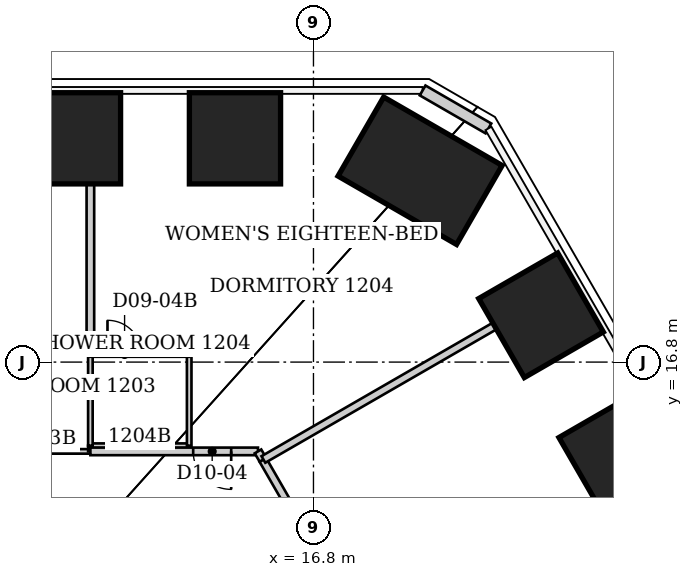
"""IFC4 building model, lengths in metres.
Left out: names, types, materials, properties, quantities, classifications, styles, units other than length and angle.
Written with IfcOpenShell. Run it as: python <this file> out.ifc"""

import sys

from ifc_helpers import new_model, si_unit, direction, frame, frame_2d, origin, origin_2d, place, context, subcontext, project, spatial, rectangle, extrude, clip, halfspace, element, fill, save


model = new_model("IFC4")
c1 = context("Model", 3, precision=1e-05, world=origin(), true_north=direction((0.0, 1.0)))
c2 = subcontext(c1, "Body", "Model", "MODEL_VIEW")
j1 = project(units=[si_unit("LENGTHUNIT", "METRE"), si_unit("PLANEANGLEUNIT", "RADIAN")], contexts=[c1])
p1 = place(None, origin())
s1 = spatial("IfcSite", under=j1, at=p1, CompositionType="ELEMENT")
p2 = place(p1, origin())
s2 = spatial("IfcBuilding", under=s1, at=p2, CompositionType="ELEMENT")
p3 = place(p2, frame((0.0, 0.0, 53.4)))
s3 = spatial("IfcBuildingStorey", under=s2, at=p3, CompositionType="ELEMENT", Elevation=53.4)
p4 = place(p3, frame((10.525, 22.689, 0.0), z_axis=(0.0, 0.0, 1.0), x_axis=(0.0, 1.0, 0.0)))
e1 = element("IfcColumn", 1, at=p4, inside=s3, PredefinedType="COLUMN", context=c2, shape_type="SweptSolid", body=[
    clip(extrude(rectangle(XDim=2.4, YDim=2.4, at=origin_2d()), origin(), (0.0, 0.0, 1.0), 3.736), halfspace(frame((0.0, 0.0, 3.64)), False)),
])
p5 = place(p3, frame((14.735, 22.689, 0.0), z_axis=(0.0, 0.0, 1.0), x_axis=(0.0, 1.0, 0.0)))
e2 = element("IfcColumn", 2, at=p5, inside=s3, PredefinedType="COLUMN", context=c2, shape_type="SweptSolid", body=[
    clip(extrude(rectangle(XDim=2.4, YDim=2.4, at=origin_2d()), origin(), (0.0, 0.0, 1.0), 3.728), halfspace(frame((0.0, 0.0, 3.64)), False)),
])
p6 = place(p3, frame((19.606, 21.835, 0.0), z_axis=(0.0, 0.0, 1.0), x_axis=(0.5, 0.866025403784, 0.0)))
e3 = element("IfcColumn", 3, at=p6, inside=s3, PredefinedType="COLUMN", context=c2, shape_type="SweptSolid", body=[
    clip(extrude(rectangle(XDim=2.4, YDim=3.6, at=origin_2d()), origin(), (0.0, 0.0, 1.0), 3.726), halfspace(frame((0.0, 0.0, 3.64)), False)),
])
p7 = place(p3, frame((22.788, 18.032, 0.0), z_axis=(0.0, 0.0, 1.0), x_axis=(0.866025403784, 0.5, 0.0)))
e4 = element("IfcColumn", 4, at=p7, inside=s3, PredefinedType="COLUMN", context=c2, shape_type="SweptSolid", body=[
    clip(extrude(rectangle(XDim=2.4, YDim=2.4, at=origin_2d()), origin(), (0.0, 0.0, 1.0), 3.737), halfspace(frame((0.0, 0.0, 3.64)), False)),
])
p8 = place(p3, frame((24.899, 14.375, 0.0), z_axis=(0.0, 0.0, 1.0), x_axis=(0.866025403784, 0.5, 0.0)))
e5 = element("IfcColumn", 5, at=p8, inside=s3, PredefinedType="COLUMN", context=c2, shape_type="SweptSolid", body=[
    clip(extrude(rectangle(XDim=2.4, YDim=2.4, at=origin_2d()), origin(), (0.0, 0.0, 1.0), 3.745), halfspace(frame((0.0, 0.0, 3.64)), False)),
])
p9 = place(p3, frame((19.672, 23.949, 0.0), z_axis=(0.0, 0.0, 1.0), x_axis=(0.866010750942, -0.50002537861, 0.0)))
e6 = element("IfcWall", 6, at=p9, inside=s3, PredefinedType="SOLIDWALL", context=c2, shape_type="SweptSolid", body=[
    extrude(rectangle(XDim=2.0, YDim=0.3, at=frame_2d((1.0, 0.0))), origin(), (0.0, 0.0, 1.0), 3.64),
])
p10 = place(p3, frame((10.93, 14.45, 0.0), z_axis=(0.0, 0.0, 1.0), x_axis=(-1.0, 0.0, 0.0)))
e7 = element("IfcWall", 7, at=p10, inside=s3, PredefinedType="PARTITIONING", context=c2, shape_type="SweptSolid", body=[
    extrude(rectangle(XDim=2.4, YDim=0.12, at=frame_2d((1.2, 0.0))), origin(), (0.0, 0.0, 1.0), 3.64),
])
p11 = place(p3, frame((10.93, 14.6, 0.0), z_axis=(0.0, 0.0, 1.0), x_axis=(0.0, -1.0, 0.0)))
e8 = element("IfcWall", 8, at=p11, inside=s3, PredefinedType="PARTITIONING", context=c2, shape_type="SweptSolid", body=[
    extrude(rectangle(XDim=0.15, YDim=0.12, at=frame_2d((0.075, 0.0))), origin(), (0.0, 0.0, 1.0), 3.64),
])
p12 = place(p3, frame((10.93, 14.6, 0.0), z_axis=(0.0, 0.0, 1.0), x_axis=(1.0, 0.0, 0.0)))
e9 = element("IfcWall", 9, at=p12, inside=s3, PredefinedType="PARTITIONING", context=c2, shape_type="SweptSolid", body=[
    extrude(rectangle(XDim=2.6, YDim=0.12, at=frame_2d((1.3, 0.0))), origin(), (0.0, 0.0, 1.0), 3.64),
])
for number, where, z_axis, x_axis in (
    (10, (10.93, 17.0, 0.0), (0.0, 0.0, 1.0), (0.0, -1.0, 0.0)),
    (11, (10.93, 17.07, 0.0), (0.0, 0.0, 1.0), (-1.0, 0.0, 0.0)),
):
    element("IfcWall", number, at=place(p3, frame(where, z_axis=z_axis, x_axis=x_axis)), inside=s3, PredefinedType="PARTITIONING", context=c2, shape_type="SweptSolid", body=[
        extrude(rectangle(XDim=2.4, YDim=0.12, at=frame_2d((1.2, 0.0))), origin(), (0.0, 0.0, 1.0), 3.64),
    ])
p13 = place(p3, frame((10.93, 23.83, 0.0), z_axis=(0.0, 0.0, 1.0), x_axis=(0.0, -1.0, 0.0)))
e12 = element("IfcWall", 12, at=p13, inside=s3, PredefinedType="PARTITIONING", context=c2, shape_type="SweptSolid", body=[
    extrude(rectangle(XDim=6.76, YDim=0.2, at=frame_2d((3.38, 0.0))), origin(), (0.0, 0.0, 1.0), 3.64),
])
p14 = place(p3, frame((13.53, 14.6, 0.0), z_axis=(0.0, 0.0, 1.0), x_axis=(0.0, 1.0, 0.0)))
e13 = element("IfcWall", 13, at=p14, inside=s3, PredefinedType="PARTITIONING", context=c2, shape_type="SweptSolid", body=[
    extrude(rectangle(XDim=2.4, YDim=0.12, at=frame_2d((1.2, 0.0))), origin(), (0.0, 0.0, 1.0), 3.64),
])
p15 = place(p3, frame((13.53, 17.0, 0.0), z_axis=(0.0, 0.0, 1.0), x_axis=(-1.0, 0.0, 0.0)))
e14 = element("IfcWall", 14, at=p15, inside=s3, PredefinedType="PARTITIONING", context=c2, shape_type="SweptSolid", body=[
    extrude(rectangle(XDim=2.6, YDim=0.12, at=frame_2d((1.3, 0.0))), origin(), (0.0, 0.0, 1.0), 3.64),
])
p16 = place(p15, frame((1.25, 0.0, 0.0)))
e15 = element("IfcOpeningElement", 15, at=p16, cuts=e14, PredefinedType="OPENING", context=c2, shape_type="SweptSolid", body=[
    extrude(rectangle(XDim=0.9, YDim=2.03, at=frame_2d((0.45, 1.015))), frame((0.0, 0.06, 0.0), z_axis=(0.0, -1.0, 0.0), x_axis=(1.0, 0.0, 0.0)), (0.0, 0.0, 1.0), 0.12),
])
p17 = place(p3, frame((15.34, 14.45, 0.0), z_axis=(0.0, 0.0, 1.0), x_axis=(-1.0, 0.0, 0.0)))
e16 = element("IfcWall", 16, at=p17, inside=s3, PredefinedType="PARTITIONING", context=c2, shape_type="SweptSolid", body=[
    extrude(rectangle(XDim=4.41, YDim=0.2, at=frame_2d((2.205, 0.0))), origin(), (0.0, 0.0, 1.0), 3.64),
])
p18 = place(p17, frame((0.705, 0.0, 0.0)))
e17 = element("IfcOpeningElement", 17, at=p18, cuts=e16, PredefinedType="OPENING", context=c2, shape_type="SweptSolid", body=[
    extrude(rectangle(XDim=1.0, YDim=2.13, at=frame_2d((0.5, 1.065))), frame((0.0, 0.1, 0.0), z_axis=(0.0, -1.0, 0.0), x_axis=(1.0, 0.0, 0.0)), (0.0, 0.0, 1.0), 0.2),
])
p19 = place(p3, frame((15.467, 14.229, 0.0), z_axis=(0.0, 0.0, 1.0), x_axis=(0.499491884095, -0.866318565958, 0.0)))
e18 = element("IfcWall", 18, at=p19, inside=s3, PredefinedType="PARTITIONING", context=c2, shape_type="SweptSolid", body=[
    extrude(rectangle(XDim=4.95, YDim=0.2, at=frame_2d((2.475, 0.0))), origin(), (0.0, 0.0, 1.0), 3.64),
])
p20 = place(p19, frame((1.975, 0.0, 0.0)))
e19 = element("IfcOpeningElement", 19, at=p20, cuts=e18, PredefinedType="OPENING", context=c2, shape_type="SweptSolid", body=[
    extrude(rectangle(XDim=1.0, YDim=2.13, at=frame_2d((0.5, 1.065))), frame((0.0, 0.1, 0.0), z_axis=(0.0, -1.0, 0.0), x_axis=(1.0, 0.0, 0.0)), (0.0, 0.0, 1.0), 0.2),
])
p21 = place(p3, frame((15.47, 14.23, 0.0), z_axis=(0.0, 0.0, 1.0), x_axis=(-0.508439495802, 0.861097717514, 0.0)))
e20 = element("IfcWall", 20, at=p21, inside=s3, PredefinedType="PARTITIONING", context=c2, shape_type="SweptSolid", body=[
    extrude(rectangle(XDim=0.255, YDim=0.2, at=frame_2d((0.128, 0.0))), origin(), (0.0, 0.0, 1.0), 3.64),
])
p22 = place(p3, frame((23.596, 18.92, 0.0), z_axis=(0.0, 0.0, 1.0), x_axis=(-0.866103566674, -0.499864593459, 0.0)))
e21 = element("IfcWall", 21, at=p22, inside=s3, PredefinedType="PARTITIONING", context=c2, shape_type="SweptSolid", body=[
    extrude(rectangle(XDim=9.367, YDim=0.2, at=frame_2d((4.684, 0.0))), origin(), (0.0, 0.0, 1.0), 3.64),
])
p23 = place(p18, origin())
e22 = element("IfcDoor", 22, at=p23, inside=s3, OperationType="SINGLE_SWING_LEFT", PredefinedType="DOOR", context=c2, shape_type="SweptSolid", body=[
    extrude(rectangle(XDim=1.0, YDim=2.13, at=frame_2d((0.5, 1.065))), frame((0.0, 0.025, 0.0), z_axis=(0.0, -1.0, 0.0), x_axis=(1.0, 0.0, 0.0)), (0.0, 0.0, 1.0), 0.05),
])
fill(e17, e22)
p24 = place(p16, origin())
e23 = element("IfcDoor", 23, at=p24, inside=s3, OperationType="SINGLE_SWING_RIGHT", PredefinedType="DOOR", context=c2, shape_type="SweptSolid", body=[
    extrude(rectangle(XDim=0.9, YDim=2.03, at=frame_2d((0.45, 1.015))), frame((0.0, 0.025, 0.0), z_axis=(0.0, -1.0, 0.0), x_axis=(1.0, 0.0, 0.0)), (0.0, 0.0, 1.0), 0.05),
])
fill(e15, e23)
save(model, sys.argv[1])
